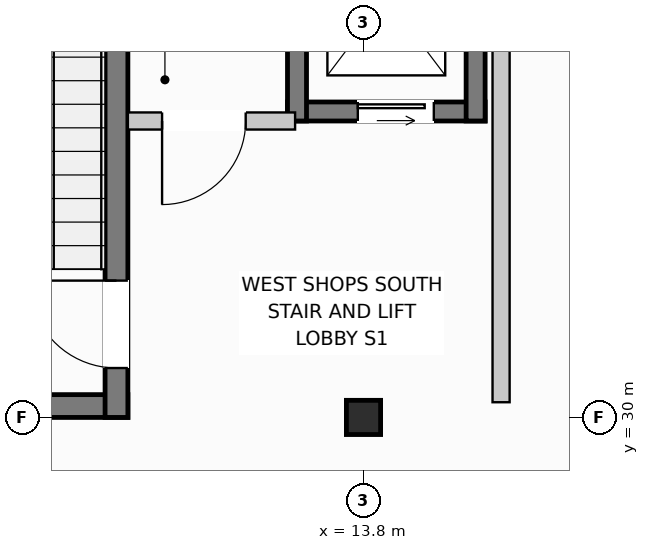
"""IFC4 building model, lengths in metres.
Left out: names, types, materials, properties, quantities, classifications, styles, units other than length and angle.
Written with IfcOpenShell. Run it as: python <this file> out.ifc"""

import sys

from ifc_helpers import new_model, si_unit, direction, frame, frame_2d, origin, origin_with_axes, origin_2d, place, context, subcontext, project, spatial, rectangle, extrude, element, fill, save


model = new_model("IFC4")
c1 = context("Model", 3, precision=1e-05, world=origin(), true_north=direction((0.0, 1.0)))
c2 = subcontext(c1, "Body", "Model", "MODEL_VIEW")
j1 = project(units=[si_unit("LENGTHUNIT", "METRE"), si_unit("PLANEANGLEUNIT", "RADIAN")], contexts=[c1])
p1 = place(None, origin())
s1 = spatial("IfcSite", under=j1, at=p1, CompositionType="ELEMENT")
p2 = place(p1, origin())
s2 = spatial("IfcBuilding", under=s1, at=p2, CompositionType="ELEMENT")
p3 = place(p2, frame((0.0, 0.0, -3.8)))
s3 = spatial("IfcBuildingStorey", under=s2, at=p3, CompositionType="ELEMENT", Elevation=-3.8)
p4 = place(p3, frame((13.8, 30.0, 0.0), z_axis=(0.0, 0.0, 1.0), x_axis=(1.0, 0.0, 0.0)))
e1 = element("IfcColumn", 1, at=p4, inside=s3, PredefinedType="COLUMN", context=c2, shape_type="SweptSolid", body=[
    extrude(rectangle(XDim=0.45, YDim=0.45, at=origin_2d()), origin(), (0.0, 0.0, 1.0), 3.8),
])
p5 = place(p3, frame((7.2, 30.15, 0.0), z_axis=(0.0, 0.0, 1.0), x_axis=(1.0, 0.0, 0.0)))
e2 = element("IfcWall", 2, at=p5, inside=s3, PredefinedType="SHEAR", context=c2, shape_type="SweptSolid", body=[
    extrude(rectangle(XDim=3.5, YDim=0.3, at=frame_2d((1.75, 0.0))), origin(), (0.0, 0.0, 1.0), 3.48),
])
p6 = place(p3, frame((10.55, 30.0, 0.0), z_axis=(0.0, 0.0, 1.0), x_axis=(0.0, 1.0, 0.0)))
e3 = element("IfcWall", 3, at=p6, inside=s3, PredefinedType="SHEAR", context=c2, shape_type="SweptSolid", body=[
    extrude(rectangle(XDim=7.5, YDim=0.3, at=frame_2d((3.75, 0.0))), origin(), (0.0, 0.0, 1.0), 3.48),
])
p7 = place(p6, frame((0.65, 0.0, 0.0)))
e4 = element("IfcOpeningElement", 4, at=p7, cuts=e3, PredefinedType="OPENING", context=c2, shape_type="SweptSolid", body=[
    extrude(rectangle(XDim=1.15, YDim=2.15, at=frame_2d((0.575, 1.075))), frame((0.0, 0.162, 0.0), z_axis=(0.0, -1.0, 0.0), x_axis=(1.0, 0.0, 0.0)), (0.0, 0.0, 1.0), 0.324),
])
p8 = place(p3, frame((12.8, 34.025, 0.0), z_axis=(0.0, 0.0, 1.0), x_axis=(1.0, 0.0, 0.0)))
e5 = element("IfcWall", 5, at=p8, inside=s3, PredefinedType="SHEAR", context=c2, shape_type="SweptSolid", body=[
    extrude(rectangle(XDim=2.6, YDim=0.25, at=frame_2d((1.3, 0.0))), origin(), (0.0, 0.0, 1.0), 3.48),
])
p9 = place(p8, frame((0.925, 0.0, 0.0)))
e6 = element("IfcOpeningElement", 6, at=p9, cuts=e5, PredefinedType="OPENING", context=c2, shape_type="SweptSolid", body=[
    extrude(rectangle(XDim=1.0, YDim=2.1, at=frame_2d((0.5, 1.05))), frame((0.0, 0.137, 0.0), z_axis=(0.0, -1.0, 0.0), x_axis=(1.0, 0.0, 0.0)), (0.0, 0.0, 1.0), 0.274),
])
for number, where, z_axis, x_axis in (
    (7, (12.925, 33.9, 0.0), (0.0, 0.0, 1.0), (0.0, 1.0, 0.0)),
    (8, (15.275, 33.9, 0.0), (0.0, 0.0, 1.0), (0.0, 1.0, 0.0)),
):
    element("IfcWall", number, at=place(p3, frame(where, z_axis=z_axis, x_axis=x_axis)), inside=s3, PredefinedType="SHEAR", context=c2, shape_type="SweptSolid", body=[
        extrude(rectangle(XDim=3.25, YDim=0.25, at=frame_2d((1.625, 0.0))), origin(), (0.0, 0.0, 1.0), 3.48),
    ])
p10 = place(p3, frame((15.61, 30.2, 0.0), z_axis=(0.0, 0.0, 1.0), x_axis=(0.0, 1.0, 0.0)))
e9 = element("IfcWall", 9, at=p10, inside=s3, PredefinedType="PARTITIONING", context=c2, shape_type="SweptSolid", body=[
    extrude(rectangle(XDim=7.6, YDim=0.225, at=frame_2d((3.8, 0.0))), origin(), (0.0, 0.0, 1.0), 3.48),
])
p11 = place(p3, frame((10.7, 33.9, 0.0), z_axis=(0.0, 0.0, 1.0), x_axis=(1.0, 0.0, 0.0)))
e10 = element("IfcWall", 10, at=p11, inside=s3, PredefinedType="PARTITIONING", context=c2, shape_type="SweptSolid", body=[
    extrude(rectangle(XDim=2.2, YDim=0.225, at=frame_2d((1.1, 0.0))), origin(), (0.0, 0.0, 1.0), 3.48),
])
p12 = place(p11, frame((0.45, 0.0, 0.0)))
e11 = element("IfcOpeningElement", 11, at=p12, cuts=e10, PredefinedType="OPENING", context=c2, shape_type="SweptSolid", body=[
    extrude(rectangle(XDim=1.1, YDim=2.15, at=frame_2d((0.55, 1.075))), frame((0.0, 0.125, 0.0), z_axis=(0.0, -1.0, 0.0), x_axis=(1.0, 0.0, 0.0)), (0.0, 0.0, 1.0), 0.249),
])
p13 = place(p7, origin_with_axes())
e12 = element("IfcDoor", 12, at=p13, inside=s3, OperationType="SINGLE_SWING_RIGHT", PredefinedType="DOOR", context=c2, shape_type="SweptSolid", body=[
    extrude(rectangle(XDim=1.15, YDim=2.15, at=frame_2d((0.575, 1.075))), frame((0.0, 0.025, 0.0), z_axis=(0.0, -1.0, 0.0), x_axis=(1.0, 0.0, 0.0)), (0.0, 0.0, 1.0), 0.05),
])
fill(e4, e12)
p14 = place(p9, origin_with_axes())
e13 = element("IfcDoor", 13, at=p14, inside=s3, OperationType="SLIDING_TO_LEFT", PredefinedType="DOOR", context=c2, shape_type="SweptSolid", body=[
    extrude(rectangle(XDim=1.0, YDim=2.1, at=frame_2d((0.5, 1.05))), frame((0.0, 0.025, 0.0), z_axis=(0.0, -1.0, 0.0), x_axis=(1.0, 0.0, 0.0)), (0.0, 0.0, 1.0), 0.05),
])
fill(e6, e13)
p15 = place(p12, frame((1.1, 0.0, 0.0), z_axis=(0.0, 0.0, 1.0), x_axis=(-1.0, 0.0, 0.0)))
e14 = element("IfcDoor", 14, at=p15, inside=s3, OperationType="SINGLE_SWING_LEFT", PredefinedType="DOOR", context=c2, shape_type="SweptSolid", body=[
    extrude(rectangle(XDim=1.1, YDim=2.15, at=frame_2d((0.55, 1.075))), frame((0.0, 0.025, 0.0), z_axis=(0.0, -1.0, 0.0), x_axis=(1.0, 0.0, 0.0)), (0.0, 0.0, 1.0), 0.05),
])
fill(e11, e14)
save(model, sys.argv[1])
